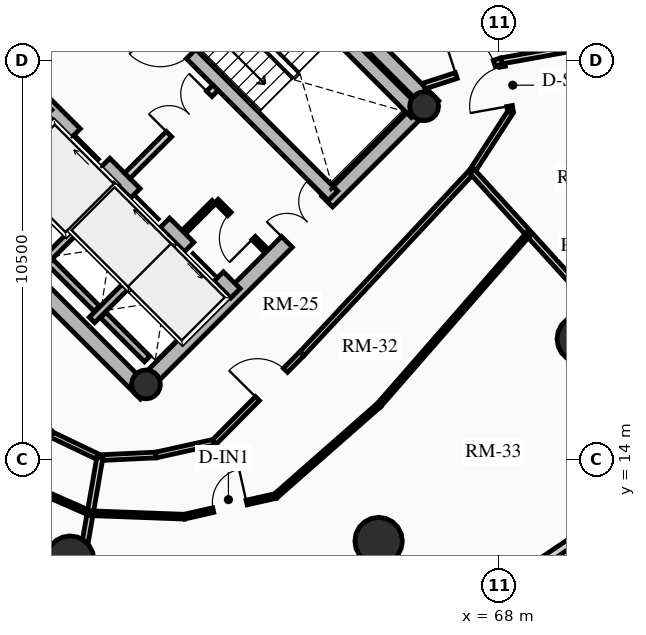
"""IFC4 building model, lengths in metres.
Left out: names, types, materials, properties, quantities, classifications, styles, units other than length and angle.
Written with IfcOpenShell. Run it as: python <this file> out.ifc"""

import sys

from ifc_helpers import new_model, si_unit, direction, frame, frame_2d, origin, origin_2d, place, context, subcontext, project, spatial, rectangle, circle, hollow_circle, extrude, source, transform, mapped, element, fill, save


model = new_model("IFC4")
c1 = context("Model", 3, precision=1e-05, world=origin(), true_north=direction((0.0, 1.0)))
c2 = subcontext(c1, "Body", "Model", "MODEL_VIEW")
j1 = project(units=[si_unit("LENGTHUNIT", "METRE"), si_unit("PLANEANGLEUNIT", "RADIAN")], contexts=[c1])
p1 = place(None, origin())
s1 = spatial("IfcSite", under=j1, at=p1, CompositionType="ELEMENT")
p2 = place(p1, origin())
s2 = spatial("IfcBuilding", under=s1, at=p2, CompositionType="ELEMENT")
p3 = place(p2, frame((0.0, 0.0, 160.33)))
s3 = spatial("IfcBuildingStorey", under=s2, at=p3, CompositionType="ELEMENT", Elevation=160.33)
for number, where, z_axis, x_axis in (
    (1, (58.702, 15.732, 0.0), (0.0, 0.0, 1.0), (-0.707, 0.707, 0.0)),
    (2, (66.268, 23.298, 0.0), (0.0, 0.0, 1.0), (-0.707, 0.707, 0.0)),
):
    element("IfcWall", number, at=place(p3, frame(where, z_axis=z_axis, x_axis=x_axis)), inside=s3, PredefinedType="SHEAR", context=c2, shape_type="SweptSolid", body=[
        extrude(rectangle(XDim=14.1, YDim=0.4, at=frame_2d((7.05, 0.0))), origin(), (0.0, 0.0, 1.0), 2.91),
    ])
p4 = place(p3, frame((58.561, 15.873, 0.0), z_axis=(0.0, 0.0, 1.0), x_axis=(0.707106781187, 0.707106781187, 0.0)))
e3 = element("IfcWall", 3, at=p4, inside=s3, PredefinedType="SHEAR", context=c2, shape_type="SweptSolid", body=[
    extrude(rectangle(XDim=10.7, YDim=0.4, at=frame_2d((5.35, 0.0))), origin(), (0.0, 0.0, 1.0), 2.91),
])
m1 = source(origin(), c2, "Body", "SweptSolid", [
    extrude(rectangle(XDim=1.5, YDim=2.02, at=frame_2d((0.75, 1.01))), frame((0.0, 0.21, 0.0), z_axis=(0.0, -1.0, 0.0), x_axis=(1.0, 0.0, 0.0)), (0.0, 0.0, 1.0), 0.42),
])
p5 = place(p4, frame((5.45, 0.0, 0.0)))
e4 = element("IfcOpeningElement", 4, at=p5, cuts=e3, PredefinedType="OPENING", context=c2, shape_type="MappedRepresentation", body=[
    mapped(m1, transform((0.0, 0.0, 0.0), x_axis=(1.0, 0.0, 0.0), y_axis=(0.0, 1.0, 0.0), z_axis=(0.0, 0.0, 1.0), scale=1.0)),
])
p6 = place(p3, frame((61.06, 18.373, 0.0), z_axis=(0.0, 0.0, 1.0), x_axis=(-0.707106781187, 0.707106781187, 0.0)))
e5 = element("IfcWall", 5, at=p6, inside=s3, PredefinedType="SHEAR", context=c2, shape_type="SweptSolid", body=[
    extrude(rectangle(XDim=13.7, YDim=0.35, at=frame_2d((6.85, 0.0))), origin(), (0.0, 0.0, 1.0), 2.91),
])
m2 = source(origin(), c2, "Body", "SweptSolid", [
    extrude(rectangle(XDim=1.1, YDim=2.015, at=frame_2d((0.55, 1.007))), frame((0.0, 0.185, 0.0), z_axis=(0.0, -1.0, 0.0), x_axis=(1.0, 0.0, 0.0)), (0.0, 0.0, 1.0), 0.37),
])
p7 = place(p6, frame((4.85, 0.0, 0.0)))
e6 = element("IfcOpeningElement", 6, at=p7, cuts=e5, PredefinedType="OPENING", context=c2, shape_type="MappedRepresentation", body=[
    mapped(m2, transform((0.0, 0.0, 0.0), x_axis=(1.0, 0.0, 0.0), y_axis=(0.0, 1.0, 0.0), z_axis=(0.0, 0.0, 1.0), scale=1.0)),
])
p8 = place(p6, frame((0.625, 0.0, 0.0)))
e7 = element("IfcOpeningElement", 7, at=p8, cuts=e5, PredefinedType="OPENING", context=c2, shape_type="MappedRepresentation", body=[
    mapped(m2, transform((0.0, 0.0, 0.0), x_axis=(1.0, 0.0, 0.0), y_axis=(0.0, 1.0, 0.0), z_axis=(0.0, 0.0, 1.0), scale=1.0)),
])
p9 = place(p6, frame((2.625, 0.0, 0.0)))
e8 = element("IfcOpeningElement", 8, at=p9, cuts=e5, PredefinedType="OPENING", context=c2, shape_type="MappedRepresentation", body=[
    mapped(m2, transform((0.0, 0.0, 0.0), x_axis=(1.0, 0.0, 0.0), y_axis=(0.0, 1.0, 0.0), z_axis=(0.0, 0.0, 1.0), scale=1.0)),
])
m3 = source(origin(), c2, "Body", "SweptSolid", [
    extrude(rectangle(XDim=1.15, YDim=2.02, at=frame_2d((0.575, 1.01))), frame((0.0, 0.185, 0.0), z_axis=(0.0, -1.0, 0.0), x_axis=(1.0, 0.0, 0.0)), (0.0, 0.0, 1.0), 0.37),
])
p10 = place(p6, frame((7.27, 0.0, 0.0)))
e9 = element("IfcOpeningElement", 9, at=p10, cuts=e5, PredefinedType="OPENING", context=c2, shape_type="MappedRepresentation", body=[
    mapped(m3, transform((0.0, 0.0, 0.0), x_axis=(1.0, 0.0, 0.0), y_axis=(0.0, 1.0, 0.0), z_axis=(0.0, 0.0, 1.0), scale=1.0)),
])
p11 = place(p3, frame((63.627, 20.94, 0.0), z_axis=(0.0, 0.0, 1.0), x_axis=(-0.707119496762, 0.707094065383, 0.0)))
e10 = element("IfcWall", 10, at=p11, inside=s3, PredefinedType="SHEAR", context=c2, shape_type="SweptSolid", body=[
    extrude(rectangle(XDim=9.6, YDim=0.35, at=frame_2d((4.8, 0.0))), origin(), (0.0, 0.0, 1.0), 2.91),
])
p12 = place(p11, frame((5.28, 0.0, 0.0)))
e11 = element("IfcOpeningElement", 11, at=p12, cuts=e10, PredefinedType="OPENING", context=c2, shape_type="MappedRepresentation", body=[
    mapped(m3, transform((0.0, 0.0, 0.0), x_axis=(1.0, 0.0, 0.0), y_axis=(0.0, 1.0, 0.0), z_axis=(0.0, 0.0, 1.0), scale=1.0)),
])
p13 = place(p3, frame((65.812, 23.125, 0.0), z_axis=(0.0, 0.0, 1.0), x_axis=(-0.707106781187, 0.707106781187, 0.0)))
e12 = element("IfcWall", 12, at=p13, inside=s3, PredefinedType="SHEAR", context=c2, shape_type="SweptSolid", body=[
    extrude(rectangle(XDim=6.695, YDim=0.35, at=frame_2d((3.348, 0.0))), origin(), (0.0, 0.0, 1.0), 2.91),
])
for number, where, z_axis, x_axis in (
    (13, (58.706, 15.976, 0.0), (0.0, 0.0, 1.0), (0.707, 0.707, 0.0)),
    (14, (66.024, 23.294, 0.0), (0.0, 0.0, 1.0), (0.707, 0.707, 0.0)),
):
    element("IfcColumn", number, at=place(p3, frame(where, z_axis=z_axis, x_axis=x_axis)), inside=s3, PredefinedType="COLUMN", context=c2, shape_type="SweptSolid", body=[
        extrude(hollow_circle(Radius=0.38, WallThickness=0.032, at=origin_2d()), origin(), (0.0, 0.0, 1.0), 2.91),
    ])
for number, where, z_axis, x_axis in (
    (15, (56.709, 11.365, 0.0), (0.0, 0.0, 1.0), (1.0, 0.0, 0.0)),
    (16, (64.827, 11.854, 0.0), (0.0, 0.0, 1.0), (1.0, 0.0, 0.0)),
    (17, (70.146, 17.173, 0.0), (0.0, 0.0, 1.0), (1.0, 0.0, 0.0)),
):
    element("IfcColumn", number, at=place(p3, frame(where, z_axis=z_axis, x_axis=x_axis)), inside=s3, PredefinedType="USERDEFINED", context=c2, shape_type="SweptSolid", body=[
        extrude(circle(Radius=0.625, at=origin_2d()), origin(), (0.0, 0.0, 1.0), 2.91),
    ])
p14 = place(p3, frame((70.065, 11.935, 0.0), z_axis=(0.0, 0.0, 1.0), x_axis=(-0.828739009952, -0.559635286042, 0.0)))
e18 = element("IfcWall", 18, at=p14, inside=s3, PredefinedType="SOLIDWALL", context=c2, shape_type="SweptSolid", body=[
    extrude(rectangle(XDim=4.569, YDim=0.22, at=frame_2d((2.284, 0.0))), origin(), (0.0, 0.0, 1.0), 2.245),
])
p15 = place(p3, frame((55.888, 19.069, 0.0), z_axis=(0.0, 0.0, 1.0), x_axis=(0.707106781187, 0.707106781187, 0.0)))
e19 = element("IfcWall", 19, at=p15, inside=s3, PredefinedType="SHEAR", context=c2, shape_type="SweptSolid", body=[
    extrude(rectangle(XDim=2.97, YDim=0.2, at=frame_2d((1.485, 0.0))), origin(), (0.0, 0.0, 1.0), 2.91),
])
p16 = place(p3, frame((57.284, 17.673, 0.0), z_axis=(0.0, 0.0, 1.0), x_axis=(0.707147878904, 0.70706568108, 0.0)))
e20 = element("IfcWall", 20, at=p16, inside=s3, PredefinedType="SHEAR", context=c2, shape_type="SweptSolid", body=[
    extrude(rectangle(XDim=2.97, YDim=0.2, at=frame_2d((1.485, 0.0))), origin(), (0.0, 0.0, 1.0), 2.91),
])
p17 = place(p3, frame((57.412, 17.97, 0.0), z_axis=(0.0, 0.0, 1.0), x_axis=(-0.707106781187, 0.707106781187, 0.0)))
e21 = element("IfcWall", 21, at=p17, inside=s3, PredefinedType="SHEAR", context=c2, shape_type="SweptSolid", body=[
    extrude(rectangle(XDim=1.735, YDim=0.2, at=frame_2d((0.867, 0.0))), origin(), (0.0, 0.0, 1.0), 2.91),
])
p18 = place(p3, frame((58.737, 16.644, 0.0), z_axis=(0.0, 0.0, 1.0), x_axis=(-0.707032117043, 0.707181437447, 0.0)))
e22 = element("IfcWall", 22, at=p18, inside=s3, PredefinedType="SHEAR", context=c2, shape_type="SweptSolid", body=[
    extrude(rectangle(XDim=1.635, YDim=0.2, at=frame_2d((0.817, 0.0))), origin(), (0.0, 0.0, 1.0), 2.91),
])
p19 = place(p3, frame((58.214, 21.467, 0.0), z_axis=(0.0, 0.0, 1.0), x_axis=(0.707106781187, 0.707106781187, 0.0)))
e23 = element("IfcWall", 23, at=p19, inside=s3, PredefinedType="PARTITIONING", context=c2, shape_type="SweptSolid", body=[
    extrude(rectangle(XDim=3.28, YDim=0.2, at=frame_2d((1.64, 0.0))), origin(), (0.0, 0.0, 1.0), 2.675),
])
m4 = source(origin(), c2, "Body", "SweptSolid", [
    extrude(rectangle(XDim=1.5, YDim=2.02, at=frame_2d((0.75, 1.01))), frame((0.0, 0.11, 0.0), z_axis=(0.0, -1.0, 0.0), x_axis=(1.0, 0.0, 0.0)), (0.0, 0.0, 1.0), 0.22),
])
p20 = place(p19, frame((1.55, 0.0, 0.0)))
e24 = element("IfcOpeningElement", 24, at=p20, cuts=e23, PredefinedType="OPENING", context=c2, shape_type="MappedRepresentation", body=[
    mapped(m4, transform((0.0, 0.0, 0.0), x_axis=(1.0, 0.0, 0.0), y_axis=(0.0, 1.0, 0.0), z_axis=(0.0, 0.0, 1.0), scale=1.0)),
])
p21 = place(p3, frame((54.961, 24.719, 0.0), z_axis=(0.0, 0.0, 1.0), x_axis=(0.707106781187, 0.707106781187, 0.0)))
e25 = element("IfcWall", 25, at=p21, inside=s3, PredefinedType="PARTITIONING", context=c2, shape_type="SweptSolid", body=[
    extrude(rectangle(XDim=3.28, YDim=0.2, at=frame_2d((1.64, 0.0))), origin(), (0.0, 0.0, 1.0), 2.675),
])
m5 = source(origin(), c2, "Body", "SweptSolid", [
    extrude(rectangle(XDim=0.9, YDim=2.005, at=frame_2d((0.45, 1.002))), frame((0.0, 0.11, 0.0), z_axis=(0.0, -1.0, 0.0), x_axis=(1.0, 0.0, 0.0)), (0.0, 0.0, 1.0), 0.22),
])
p22 = place(p21, frame((0.16, 0.0, 0.0)))
e26 = element("IfcOpeningElement", 26, at=p22, cuts=e25, PredefinedType="OPENING", context=c2, shape_type="MappedRepresentation", body=[
    mapped(m5, transform((0.0, 0.0, 0.0), x_axis=(1.0, 0.0, 0.0), y_axis=(0.0, 1.0, 0.0), z_axis=(0.0, 0.0, 1.0), scale=1.0)),
])
p23 = place(p3, frame((61.835, 19.529, 0.0), z_axis=(0.0, 0.0, 1.0), x_axis=(-0.707174592913, 0.707038962956, 0.0)))
e27 = element("IfcWall", 27, at=p23, inside=s3, PredefinedType="PARTITIONING", context=c2, shape_type="SweptSolid", body=[
    extrude(rectangle(XDim=1.8, YDim=0.125, at=frame_2d((0.9, 0.0))), origin(), (0.0, 0.0, 1.0), 2.675),
])
m6 = source(origin(), c2, "Body", "SweptSolid", [
    extrude(rectangle(XDim=0.9, YDim=2.005, at=frame_2d((0.45, 1.002))), frame((0.0, 0.073, 0.0), z_axis=(0.0, -1.0, 0.0), x_axis=(1.0, 0.0, 0.0)), (0.0, 0.0, 1.0), 0.145),
])
p24 = place(p23, frame((0.42, 0.0, 0.0)))
e28 = element("IfcOpeningElement", 28, at=p24, cuts=e27, PredefinedType="OPENING", context=c2, shape_type="MappedRepresentation", body=[
    mapped(m6, transform((0.0, 0.0, 0.0), x_axis=(1.0, 0.0, 0.0), y_axis=(0.0, 1.0, 0.0), z_axis=(0.0, 0.0, 1.0), scale=1.0)),
])
p25 = place(p3, frame((59.713, 19.996, 0.0), z_axis=(0.0, 0.0, 1.0), x_axis=(0.707217726, 0.706995818963, 0.0)))
e29 = element("IfcWall", 29, at=p25, inside=s3, PredefinedType="PARTITIONING", context=c2, shape_type="SweptSolid", body=[
    extrude(rectangle(XDim=1.1, YDim=0.125, at=frame_2d((0.55, 0.0))), origin(), (0.0, 0.0, 1.0), 2.675),
])
p26 = place(p3, frame((51.985, 18.985, 0.0), z_axis=(0.0, 0.0, 1.0), x_axis=(0.699619654291, -0.714515457726, 0.0)))
e30 = element("IfcWall", 30, at=p26, inside=s3, PredefinedType="PARTITIONING", context=c2, shape_type="SweptSolid", body=[
    extrude(rectangle(XDim=6.064, YDim=0.15, at=frame_2d((3.032, 0.0))), origin(), (0.0, 0.0, 1.0), 2.245),
])
m7 = source(origin(), c2, "Body", "SweptSolid", [
    extrude(rectangle(XDim=1.05, YDim=2.015, at=frame_2d((0.525, 1.007))), frame((0.0, 0.085, 0.0), z_axis=(0.0, -1.0, 0.0), x_axis=(1.0, 0.0, 0.0)), (0.0, 0.0, 1.0), 0.17),
])
p27 = place(p26, frame((2.507, 0.0, 0.0)))
e31 = element("IfcOpeningElement", 31, at=p27, cuts=e30, PredefinedType="OPENING", context=c2, shape_type="MappedRepresentation", body=[
    mapped(m7, transform((0.0, 0.0, 0.0), x_axis=(1.0, 0.0, 0.0), y_axis=(0.0, 1.0, 0.0), z_axis=(0.0, 0.0, 1.0), scale=1.0)),
])
p28 = place(p3, frame((56.227, 14.652, 0.0), z_axis=(0.0, 0.0, 1.0), x_axis=(0.902364039563, -0.430974639745, 0.0)))
e32 = element("IfcWall", 32, at=p28, inside=s3, PredefinedType="PARTITIONING", context=c2, shape_type="SweptSolid", body=[
    extrude(rectangle(XDim=1.401, YDim=0.15, at=frame_2d((0.701, 0.0))), origin(), (0.0, 0.0, 1.0), 2.245),
])
p29 = place(p3, frame((57.492, 14.048, 0.0), z_axis=(0.0, 0.0, 1.0), x_axis=(0.99885011351, 0.047942160364, 0.0)))
e33 = element("IfcWall", 33, at=p29, inside=s3, PredefinedType="PARTITIONING", context=c2, shape_type="SweptSolid", body=[
    extrude(rectangle(XDim=1.477, YDim=0.15, at=frame_2d((0.738, 0.0))), origin(), (0.0, 0.0, 1.0), 2.245),
])
p30 = place(p3, frame((58.967, 14.118, 0.0), z_axis=(0.0, 0.0, 1.0), x_axis=(0.976471358036, 0.215647135235, 0.0)))
e34 = element("IfcWall", 34, at=p30, inside=s3, PredefinedType="PARTITIONING", context=c2, shape_type="SweptSolid", body=[
    extrude(rectangle(XDim=1.571, YDim=0.15, at=frame_2d((0.786, 0.0))), origin(), (0.0, 0.0, 1.0), 2.245),
])
p31 = place(p3, frame((60.501, 14.457, 0.0), z_axis=(0.0, 0.0, 1.0), x_axis=(0.704012266258, 0.710187812454, 0.0)))
e35 = element("IfcWall", 35, at=p31, inside=s3, PredefinedType="PARTITIONING", context=c2, shape_type="SweptSolid", body=[
    extrude(rectangle(XDim=3.281, YDim=0.15, at=frame_2d((1.641, 0.0))), origin(), (0.0, 0.0, 1.0), 2.245),
])
p32 = place(p31, frame((1.614, 0.0, 0.0)))
e36 = element("IfcOpeningElement", 36, at=p32, cuts=e35, PredefinedType="OPENING", context=c2, shape_type="MappedRepresentation", body=[
    mapped(m7, transform((0.0, 0.0, 0.0), x_axis=(1.0, 0.0, 0.0), y_axis=(0.0, 1.0, 0.0), z_axis=(0.0, 0.0, 1.0), scale=1.0)),
])
p33 = place(p3, frame((62.812, 16.788, 0.0), z_axis=(0.0, 0.0, 1.0), x_axis=(0.682323555485, 0.731050316757, 0.0)))
e37 = element("IfcWall", 37, at=p33, inside=s3, PredefinedType="PARTITIONING", context=c2, shape_type="SweptSolid", body=[
    extrude(rectangle(XDim=6.559, YDim=0.15, at=frame_2d((3.279, 0.0))), origin(), (0.0, 0.0, 1.0), 2.245),
])
p34 = place(p3, frame((67.287, 21.582, 0.0), z_axis=(0.0, 0.0, 1.0), x_axis=(0.543202443884, 0.839601753785, 0.0)))
e38 = element("IfcWall", 38, at=p34, inside=s3, PredefinedType="PARTITIONING", context=c2, shape_type="SweptSolid", body=[
    extrude(rectangle(XDim=1.866, YDim=0.15, at=frame_2d((0.933, 0.0))), origin(), (0.0, 0.0, 1.0), 2.245),
])
p35 = place(p3, frame((68.3, 23.149, 0.0), z_axis=(0.0, 0.0, 1.0), x_axis=(-0.176423554694, 0.984314344785, 0.0)))
e39 = element("IfcWall", 39, at=p35, inside=s3, PredefinedType="PARTITIONING", context=c2, shape_type="SweptSolid", body=[
    extrude(rectangle(XDim=1.362, YDim=0.15, at=frame_2d((0.681, 0.0))), origin(), (0.0, 0.0, 1.0), 2.245),
])
p36 = place(p35, frame((0.156, 0.0, 0.0)))
e40 = element("IfcOpeningElement", 40, at=p36, cuts=e39, PredefinedType="OPENING", context=c2, shape_type="MappedRepresentation", body=[
    mapped(m7, transform((0.0, 0.0, 0.0), x_axis=(1.0, 0.0, 0.0), y_axis=(0.0, 1.0, 0.0), z_axis=(0.0, 0.0, 1.0), scale=1.0)),
])
p37 = place(p3, frame((57.492, 14.048, 0.0), z_axis=(0.0, 0.0, 1.0), x_axis=(-0.171191349619, -0.985237799628, 0.0)))
e41 = element("IfcWall", 41, at=p37, inside=s3, PredefinedType="PARTITIONING", context=c2, shape_type="SweptSolid", body=[
    extrude(rectangle(XDim=5.295, YDim=0.16, at=frame_2d((2.647, 0.0))), origin(), (0.0, 0.0, 1.0), 2.245),
])
p38 = place(p3, frame((67.287, 21.582, 0.0), z_axis=(0.0, 0.0, 1.0), x_axis=(0.672520632772, -0.740078373212, 0.0)))
e42 = element("IfcWall", 42, at=p38, inside=s3, PredefinedType="PARTITIONING", context=c2, shape_type="SweptSolid", body=[
    extrude(rectangle(XDim=7.907, YDim=0.16, at=frame_2d((3.954, 0.0))), origin(), (0.0, 0.0, 1.0), 2.245),
])
p39 = place(p3, frame((68.06, 24.489, 0.0), z_axis=(0.0, 0.0, 1.0), x_axis=(0.983987798657, 0.178235832802, 0.0)))
e43 = element("IfcWall", 43, at=p39, inside=s3, PredefinedType="PARTITIONING", context=c2, shape_type="SweptSolid", body=[
    extrude(rectangle(XDim=5.193, YDim=0.16, at=frame_2d((2.596, 0.0))), origin(), (0.0, 0.0, 1.0), 2.245),
])
p40 = place(p3, frame((66.021, 23.828, 0.0), z_axis=(0.0, 0.0, 1.0), x_axis=(0.951292345965, 0.308290240695, 0.0)))
e44 = element("IfcWall", 44, at=p40, inside=s3, PredefinedType="PARTITIONING", context=c2, shape_type="SweptSolid", body=[
    extrude(rectangle(XDim=2.144, YDim=0.16, at=frame_2d((1.072, 0.0))), origin(), (0.0, 0.0, 1.0), 2.245),
])
m8 = source(origin(), c2, "Body", "SweptSolid", [
    extrude(rectangle(XDim=1.05, YDim=2.015, at=frame_2d((0.525, 1.007))), frame((0.0, 0.09, 0.0), z_axis=(0.0, -1.0, 0.0), x_axis=(1.0, 0.0, 0.0)), (0.0, 0.0, 1.0), 0.18),
])
p41 = place(p40, frame((0.894, 0.0, 0.0)))
e45 = element("IfcOpeningElement", 45, at=p41, cuts=e44, PredefinedType="OPENING", context=c2, shape_type="MappedRepresentation", body=[
    mapped(m8, transform((0.0, 0.0, 0.0), x_axis=(1.0, 0.0, 0.0), y_axis=(0.0, 1.0, 0.0), z_axis=(0.0, 0.0, 1.0), scale=1.0)),
])
p42 = place(p3, frame((54.94, 13.594, 0.0), z_axis=(0.0, 0.0, 1.0), x_axis=(0.915898070967, -0.401410916143, 0.0)))
e46 = element("IfcWall", 46, at=p42, inside=s3, PredefinedType="PARTITIONING", context=c2, shape_type="SweptSolid", body=[
    extrude(rectangle(XDim=2.509, YDim=0.125, at=frame_2d((1.254, 0.0))), origin(), (0.0, 0.0, 1.0), 2.245),
])
p43 = place(p3, frame((57.238, 12.587, 0.0), z_axis=(0.0, 0.0, 1.0), x_axis=(0.999316318576, -0.036971548882, 0.0)))
e47 = element("IfcWall", 47, at=p43, inside=s3, PredefinedType="PARTITIONING", context=c2, shape_type="SweptSolid", body=[
    extrude(rectangle(XDim=2.476, YDim=0.125, at=frame_2d((1.238, 0.0))), origin(), (0.0, 0.0, 1.0), 2.245),
])
p44 = place(p3, frame((59.713, 12.495, 0.0), z_axis=(0.0, 0.0, 1.0), x_axis=(0.975260144608, 0.221060286662, 0.0)))
e48 = element("IfcWall", 48, at=p44, inside=s3, PredefinedType="PARTITIONING", context=c2, shape_type="SweptSolid", body=[
    extrude(rectangle(XDim=2.465, YDim=0.125, at=frame_2d((1.232, 0.0))), origin(), (0.0, 0.0, 1.0), 2.245),
])
p45 = place(p44, frame((0.782, 0.0, 0.0)))
e49 = element("IfcOpeningElement", 49, at=p45, cuts=e48, PredefinedType="OPENING", context=c2, shape_type="MappedRepresentation", body=[
    mapped(m6, transform((0.0, 0.0, 0.0), x_axis=(1.0, 0.0, 0.0), y_axis=(0.0, 1.0, 0.0), z_axis=(0.0, 0.0, 1.0), scale=1.0)),
])
p46 = place(p3, frame((62.117, 13.04, 0.0), z_axis=(0.0, 0.0, 1.0), x_axis=(0.751084924077, 0.660205601933, 0.0)))
e50 = element("IfcWall", 50, at=p46, inside=s3, PredefinedType="PARTITIONING", context=c2, shape_type="SweptSolid", body=[
    extrude(rectangle(XDim=3.624, YDim=0.125, at=frame_2d((1.812, 0.0))), origin(), (0.0, 0.0, 1.0), 2.245),
])
p47 = place(p3, frame((64.839, 15.433, 0.0), z_axis=(0.0, 0.0, 1.0), x_axis=(0.657505208165, 0.753449999161, 0.0)))
e51 = element("IfcWall", 51, at=p47, inside=s3, PredefinedType="PARTITIONING", context=c2, shape_type="SweptSolid", body=[
    extrude(rectangle(XDim=5.988, YDim=0.125, at=frame_2d((2.994, 0.0))), origin(), (0.0, 0.0, 1.0), 2.245),
])
m9 = source(origin(), c2, "Body", "SweptSolid", [
    extrude(rectangle(XDim=1.1, YDim=2.015, at=frame_2d((0.55, 1.007))), frame((0.0, 0.025, 0.0), z_axis=(0.0, -1.0, 0.0), x_axis=(1.0, 0.0, 0.0)), (0.0, 0.0, 1.0), 0.05),
])
p48 = place(p7, origin())
e52 = element("IfcDoor", 52, at=p48, inside=s3, OperationType="SLIDING_TO_RIGHT", PredefinedType="DOOR", context=c2, shape_type="MappedRepresentation", body=[
    mapped(m9, transform((0.0, 0.0, 0.0), x_axis=(1.0, 0.0, 0.0), y_axis=(0.0, 1.0, 0.0), z_axis=(0.0, 0.0, 1.0), scale=1.0)),
])
fill(e6, e52)
p49 = place(p8, origin())
e53 = element("IfcDoor", 53, at=p49, inside=s3, OperationType="SLIDING_TO_LEFT", PredefinedType="DOOR", context=c2, shape_type="MappedRepresentation", body=[
    mapped(m9, transform((0.0, 0.0, 0.0), x_axis=(1.0, 0.0, 0.0), y_axis=(0.0, 1.0, 0.0), z_axis=(0.0, 0.0, 1.0), scale=1.0)),
])
fill(e7, e53)
p50 = place(p9, origin())
e54 = element("IfcDoor", 54, at=p50, inside=s3, OperationType="SLIDING_TO_RIGHT", PredefinedType="DOOR", context=c2, shape_type="MappedRepresentation", body=[
    mapped(m9, transform((0.0, 0.0, 0.0), x_axis=(1.0, 0.0, 0.0), y_axis=(0.0, 1.0, 0.0), z_axis=(0.0, 0.0, 1.0), scale=1.0)),
])
fill(e8, e54)
m10 = source(origin(), c2, "Body", "SweptSolid", [
    extrude(rectangle(XDim=1.15, YDim=2.02, at=frame_2d((0.575, 1.01))), frame((0.0, 0.025, 0.0), z_axis=(0.0, -1.0, 0.0), x_axis=(1.0, 0.0, 0.0)), (0.0, 0.0, 1.0), 0.05),
])
p51 = place(p12, origin())
e55 = element("IfcDoor", 55, at=p51, inside=s3, OperationType="SINGLE_SWING_RIGHT", PredefinedType="DOOR", context=c2, shape_type="MappedRepresentation", body=[
    mapped(m10, transform((0.0, 0.0, 0.0), x_axis=(1.0, 0.0, 0.0), y_axis=(0.0, 1.0, 0.0), z_axis=(0.0, 0.0, 1.0), scale=1.0)),
])
fill(e11, e55)
m11 = source(origin(), c2, "Body", "SweptSolid", [
    extrude(rectangle(XDim=1.5, YDim=2.02, at=frame_2d((0.75, 1.01))), frame((0.0, 0.025, 0.0), z_axis=(0.0, -1.0, 0.0), x_axis=(1.0, 0.0, 0.0)), (0.0, 0.0, 1.0), 0.05),
])
p52 = place(p5, origin())
e56 = element("IfcDoor", 56, at=p52, inside=s3, OperationType="DOUBLE_DOOR_SINGLE_SWING", PredefinedType="DOOR", context=c2, shape_type="MappedRepresentation", body=[
    mapped(m11, transform((0.0, 0.0, 0.0), x_axis=(1.0, 0.0, 0.0), y_axis=(0.0, 1.0, 0.0), z_axis=(0.0, 0.0, 1.0), scale=1.0)),
])
fill(e4, e56)
p53 = place(p20, origin())
e57 = element("IfcDoor", 57, at=p53, inside=s3, OperationType="DOUBLE_DOOR_SINGLE_SWING", PredefinedType="DOOR", context=c2, shape_type="MappedRepresentation", body=[
    mapped(m11, transform((0.0, 0.0, 0.0), x_axis=(1.0, 0.0, 0.0), y_axis=(0.0, 1.0, 0.0), z_axis=(0.0, 0.0, 1.0), scale=1.0)),
])
fill(e24, e57)
m12 = source(origin(), c2, "Body", "SweptSolid", [
    extrude(rectangle(XDim=0.9, YDim=2.005, at=frame_2d((0.45, 1.002))), frame((0.0, 0.025, 0.0), z_axis=(0.0, -1.0, 0.0), x_axis=(1.0, 0.0, 0.0)), (0.0, 0.0, 1.0), 0.05),
])
p54 = place(p24, origin())
e58 = element("IfcDoor", 58, at=p54, inside=s3, OperationType="SINGLE_SWING_LEFT", PredefinedType="DOOR", context=c2, shape_type="MappedRepresentation", body=[
    mapped(m12, transform((0.0, 0.0, 0.0), x_axis=(1.0, 0.0, 0.0), y_axis=(0.0, 1.0, 0.0), z_axis=(0.0, 0.0, 1.0), scale=1.0)),
])
fill(e28, e58)
m13 = source(origin(), c2, "Body", "SweptSolid", [
    extrude(rectangle(XDim=1.05, YDim=2.015, at=frame_2d((0.525, 1.007))), frame((0.0, 0.025, 0.0), z_axis=(0.0, -1.0, 0.0), x_axis=(1.0, 0.0, 0.0)), (0.0, 0.0, 1.0), 0.05),
])
p55 = place(p41, origin())
e59 = element("IfcDoor", 59, at=p55, inside=s3, OperationType="SINGLE_SWING_LEFT", PredefinedType="DOOR", context=c2, shape_type="MappedRepresentation", body=[
    mapped(m13, transform((0.0, 0.0, 0.0), x_axis=(1.0, 0.0, 0.0), y_axis=(0.0, 1.0, 0.0), z_axis=(0.0, 0.0, 1.0), scale=1.0)),
])
fill(e45, e59)
p56 = place(p32, origin())
e60 = element("IfcDoor", 60, at=p56, inside=s3, OperationType="SINGLE_SWING_LEFT", PredefinedType="DOOR", context=c2, shape_type="MappedRepresentation", body=[
    mapped(m13, transform((0.0, 0.0, 0.0), x_axis=(1.0, 0.0, 0.0), y_axis=(0.0, 1.0, 0.0), z_axis=(0.0, 0.0, 1.0), scale=1.0)),
])
fill(e36, e60)
p57 = place(p45, origin())
e61 = element("IfcDoor", 61, at=p57, inside=s3, OperationType="SINGLE_SWING_RIGHT", PredefinedType="DOOR", context=c2, shape_type="MappedRepresentation", body=[
    mapped(m12, transform((0.0, 0.0, 0.0), x_axis=(1.0, 0.0, 0.0), y_axis=(0.0, 1.0, 0.0), z_axis=(0.0, 0.0, 1.0), scale=1.0)),
])
fill(e49, e61)
p58 = place(p36, origin())
e62 = element("IfcDoor", 62, at=p58, inside=s3, OperationType="SINGLE_SWING_LEFT", PredefinedType="DOOR", context=c2, shape_type="MappedRepresentation", body=[
    mapped(m13, transform((0.0, 0.0, 0.0), x_axis=(1.0, 0.0, 0.0), y_axis=(0.0, 1.0, 0.0), z_axis=(0.0, 0.0, 1.0), scale=1.0)),
])
fill(e40, e62)
save(model, sys.argv[1])
